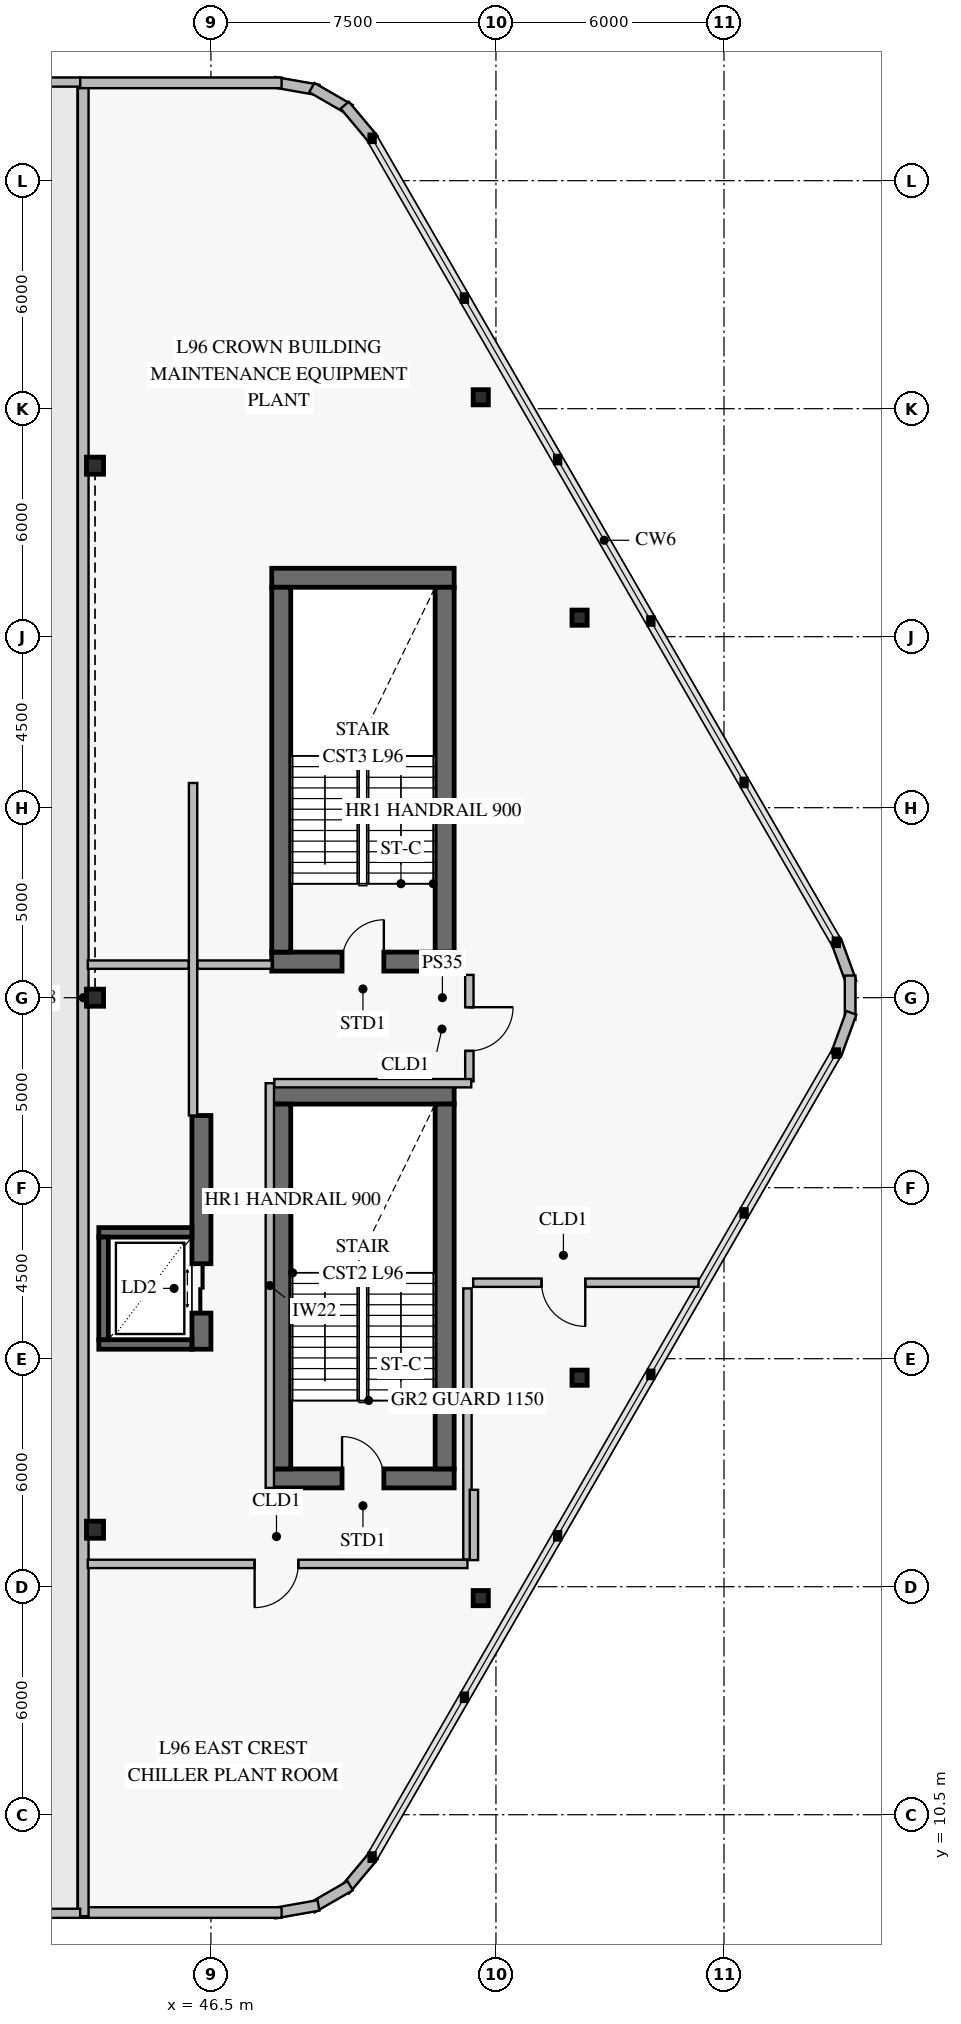
"""IFC4 building model, lengths in metres.
Left out: names, types, materials, properties, quantities, classifications, styles, units other than length and angle.
Written with IfcOpenShell. Run it as: python <this file> out.ifc"""

import sys

from ifc_helpers import new_model, si_unit, direction, frame, frame_2d, origin, origin_2d, place, context, subcontext, project, spatial, rectangle, hollow_rectangle, i_section, extrude, element, fill, save


model = new_model("IFC4")
c1 = context("Model", 3, precision=1e-05, world=origin(), true_north=direction((0.0, 1.0)))
c2 = subcontext(c1, "Body", "Model", "MODEL_VIEW")
j1 = project(units=[si_unit("LENGTHUNIT", "METRE"), si_unit("PLANEANGLEUNIT", "RADIAN")], contexts=[c1])
p1 = place(None, origin())
s1 = spatial("IfcSite", under=j1, at=p1, CompositionType="ELEMENT")
p2 = place(p1, origin())
s2 = spatial("IfcBuilding", under=s1, at=p2, CompositionType="ELEMENT")
p3 = place(p2, frame((0.0, 0.0, 379.0)))
s3 = spatial("IfcBuildingStorey", under=s2, at=p3, CompositionType="ELEMENT", Elevation=379.0)
p4 = place(p3, frame((48.1, 19.35, 0.0), z_axis=(0.0, 0.0, 1.0), x_axis=(1.0, 0.0, 0.0)))
e1 = element("IfcWall", 1, at=p4, inside=s3, PredefinedType="SHEAR", context=c2, shape_type="SweptSolid", body=[
    extrude(rectangle(XDim=4.8, YDim=0.5, at=frame_2d((2.4, 0.0))), origin(), (0.0, 0.0, 1.0), 4.4),
])
p5 = place(p4, frame((1.85, 0.0, 0.0)))
e2 = element("IfcOpeningElement", 2, at=p5, cuts=e1, PredefinedType="OPENING", context=c2, shape_type="SweptSolid", body=[
    extrude(rectangle(XDim=1.1, YDim=2.15, at=frame_2d((0.55, 1.075))), frame((0.0, 0.262, 0.0), z_axis=(0.0, -1.0, 0.0), x_axis=(1.0, 0.0, 0.0)), (0.0, 0.0, 1.0), 0.524),
])
p6 = place(p3, frame((52.9, 29.45, 0.0), z_axis=(0.0, 0.0, 1.0), x_axis=(-1.0, 0.0, 0.0)))
e3 = element("IfcWall", 3, at=p6, inside=s3, PredefinedType="SHEAR", context=c2, shape_type="SweptSolid", body=[
    extrude(rectangle(XDim=4.8, YDim=0.5, at=frame_2d((2.4, 0.0))), origin(), (0.0, 0.0, 1.0), 4.4),
])
for number, where, z_axis, x_axis in (
    (4, (48.35, 19.6, 0.0), (0.0, 0.0, 1.0), (0.0, 1.0, 0.0)),
    (5, (52.65, 29.2, 0.0), (0.0, 0.0, 1.0), (0.0, -1.0, 0.0)),
):
    element("IfcWall", number, at=place(p3, frame(where, z_axis=z_axis, x_axis=x_axis)), inside=s3, PredefinedType="SHEAR", context=c2, shape_type="SweptSolid", body=[
        extrude(rectangle(XDim=9.6, YDim=0.5, at=frame_2d((4.8, 0.0))), origin(), (0.0, 0.0, 1.0), 4.4),
    ])
p7 = place(p3, frame((48.1, 32.95, 0.0), z_axis=(0.0, 0.0, 1.0), x_axis=(1.0, 0.0, 0.0)))
e6 = element("IfcWall", 6, at=p7, inside=s3, PredefinedType="SHEAR", context=c2, shape_type="SweptSolid", body=[
    extrude(rectangle(XDim=4.8, YDim=0.5, at=frame_2d((2.4, 0.0))), origin(), (0.0, 0.0, 1.0), 4.4),
])
p8 = place(p7, frame((1.85, 0.0, 0.0)))
e7 = element("IfcOpeningElement", 7, at=p8, cuts=e6, PredefinedType="OPENING", context=c2, shape_type="SweptSolid", body=[
    extrude(rectangle(XDim=1.1, YDim=2.15, at=frame_2d((0.55, 1.075))), frame((0.0, 0.262, 0.0), z_axis=(0.0, -1.0, 0.0), x_axis=(1.0, 0.0, 0.0)), (0.0, 0.0, 1.0), 0.524),
])
p9 = place(p3, frame((52.9, 43.05, 0.0), z_axis=(0.0, 0.0, 1.0), x_axis=(-1.0, 0.0, 0.0)))
e8 = element("IfcWall", 8, at=p9, inside=s3, PredefinedType="SHEAR", context=c2, shape_type="SweptSolid", body=[
    extrude(rectangle(XDim=4.8, YDim=0.5, at=frame_2d((2.4, 0.0))), origin(), (0.0, 0.0, 1.0), 4.4),
])
for number, where, z_axis, x_axis in (
    (9, (48.35, 33.2, 0.0), (0.0, 0.0, 1.0), (0.0, 1.0, 0.0)),
    (10, (52.65, 42.8, 0.0), (0.0, 0.0, 1.0), (0.0, -1.0, 0.0)),
):
    element("IfcWall", number, at=place(p3, frame(where, z_axis=z_axis, x_axis=x_axis)), inside=s3, PredefinedType="SHEAR", context=c2, shape_type="SweptSolid", body=[
        extrude(rectangle(XDim=9.6, YDim=0.5, at=frame_2d((4.8, 0.0))), origin(), (0.0, 0.0, 1.0), 4.4),
    ])
p10 = place(p3, frame((46.25, 22.75, 0.0), z_axis=(0.0, 0.0, 1.0), x_axis=(0.0, 1.0, 0.0)))
e11 = element("IfcWall", 11, at=p10, inside=s3, PredefinedType="SHEAR", context=c2, shape_type="SweptSolid", body=[
    extrude(rectangle(XDim=6.15, YDim=0.5, at=frame_2d((3.075, 0.0))), origin(), (0.0, 0.0, 1.0), 4.4),
])
p11 = place(p10, frame((0.95, 0.0, 0.0)))
e12 = element("IfcOpeningElement", 12, at=p11, cuts=e11, PredefinedType="OPENING", context=c2, shape_type="SweptSolid", body=[
    extrude(rectangle(XDim=1.3, YDim=2.3, at=frame_2d((0.65, 1.15))), frame((0.0, 0.262, 0.0), z_axis=(0.0, -1.0, 0.0), x_axis=(1.0, 0.0, 0.0)), (0.0, 0.0, 1.0), 0.524),
])
for number, where, z_axis, x_axis in (
    (13, (56.2, 22.0, 0.0), (0.0, 0.0, 1.0), (1.0, 0.0, 0.0)),
    (14, (56.2, 42.0, 0.0), (0.0, 0.0, 1.0), (1.0, 0.0, 0.0)),
    (15, (53.6, 16.2, 0.0), (0.0, 0.0, 1.0), (1.0, 0.0, 0.0)),
    (16, (53.6, 47.8, 0.0), (0.0, 0.0, 1.0), (1.0, 0.0, 0.0)),
):
    element("IfcColumn", number, at=place(p3, frame(where, z_axis=z_axis, x_axis=x_axis)), inside=s3, PredefinedType="COLUMN", context=c2, shape_type="SweptSolid", body=[
        extrude(i_section(OverallWidth=0.4, OverallDepth=0.4, WebThickness=0.013, FlangeThickness=0.021, at=origin_2d()), origin(), (0.0, 0.0, 1.0), 4.05),
    ])
for number, where, z_axis, x_axis in (
    (17, (43.45, 18.0, 0.0), (0.0, 0.0, 1.0), (1.0, 0.0, 0.0)),
    (18, (43.45, 32.0, 0.0), (0.0, 0.0, 1.0), (1.0, 0.0, 0.0)),
    (19, (43.45, 46.0, 0.0), (0.0, 0.0, 1.0), (1.0, 0.0, 0.0)),
):
    element("IfcColumn", number, at=place(p3, frame(where, z_axis=z_axis, x_axis=x_axis)), inside=s3, PredefinedType="PILASTER", context=c2, shape_type="SweptSolid", body=[
        extrude(hollow_rectangle(XDim=0.45, YDim=0.45, WallThickness=0.022, at=origin_2d()), origin(), (0.0, 0.0, 1.0), 4.05),
    ])
p12 = place(p3, frame((48.171, 56.091, 0.0), z_axis=(0.0, 0.0, 1.0), x_axis=(0.984798162481, -0.173702559495, 0.0)))
e20 = element("IfcWall", 20, at=p12, inside=s3, PredefinedType="SOLIDWALL", context=c2, shape_type="SweptSolid", body=[
    extrude(rectangle(XDim=1.178, YDim=0.28, at=frame_2d((0.589, 0.0))), origin(), (0.0, 0.0, 1.0), 4.05),
])
p13 = place(p3, frame((49.155, 55.95, 0.0), z_axis=(0.0, 0.0, 1.0), x_axis=(0.865951785477, -0.500127488975, 0.0)))
e21 = element("IfcWall", 21, at=p13, inside=s3, PredefinedType="SOLIDWALL", context=c2, shape_type="SweptSolid", body=[
    extrude(rectangle(XDim=1.165, YDim=0.28, at=frame_2d((0.583, 0.0))), origin(), (0.0, 0.0, 1.0), 4.05),
])
for number, where, z_axis, x_axis in (
    (22, (50.021, 55.488, 0.0), (0.0, 0.0, 1.0), (0.643, -0.766, 0.0)),
    (23, (62.948, 33.505, 0.0), (0.0, 0.0, 1.0), (0.342, -0.94, 0.0)),
):
    element("IfcWall", number, at=place(p3, frame(where, z_axis=z_axis, x_axis=x_axis)), inside=s3, PredefinedType="SOLIDWALL", context=c2, shape_type="SweptSolid", body=[
        extrude(rectangle(XDim=1.178, YDim=0.28, at=frame_2d((0.589, 0.0))), origin(), (0.0, 0.0, 1.0), 4.05),
    ])
p14 = place(p3, frame((63.319, 32.583, 0.0), z_axis=(0.0, 0.0, 1.0), x_axis=(0.0, -1.0, 0.0)))
e24 = element("IfcWall", 24, at=p14, inside=s3, PredefinedType="SOLIDWALL", context=c2, shape_type="SweptSolid", body=[
    extrude(rectangle(XDim=1.165, YDim=0.28, at=frame_2d((0.583, 0.0))), origin(), (0.0, 0.0, 1.0), 4.05),
])
for number, where, z_axis, x_axis in (
    (25, (63.351, 31.602, 0.0), (0.0, 0.0, 1.0), (-0.342, -0.94, 0.0)),
    (26, (50.778, 9.414, 0.0), (0.0, 0.0, 1.0), (-0.643, -0.766, 0.0)),
):
    element("IfcWall", number, at=place(p3, frame(where, z_axis=z_axis, x_axis=x_axis)), inside=s3, PredefinedType="SOLIDWALL", context=c2, shape_type="SweptSolid", body=[
        extrude(rectangle(XDim=1.178, YDim=0.28, at=frame_2d((0.589, 0.0))), origin(), (0.0, 0.0, 1.0), 4.05),
    ])
p15 = place(p3, frame((50.164, 8.633, 0.0), z_axis=(0.0, 0.0, 1.0), x_axis=(-0.865951785477, -0.500127488975, 0.0)))
e27 = element("IfcWall", 27, at=p15, inside=s3, PredefinedType="SOLIDWALL", context=c2, shape_type="SweptSolid", body=[
    extrude(rectangle(XDim=1.165, YDim=0.28, at=frame_2d((0.583, 0.0))), origin(), (0.0, 0.0, 1.0), 4.05),
])
p16 = place(p3, frame((49.331, 8.114, 0.0), z_axis=(0.0, 0.0, 1.0), x_axis=(-0.984798162481, -0.173702559495, 0.0)))
e28 = element("IfcWall", 28, at=p16, inside=s3, PredefinedType="SOLIDWALL", context=c2, shape_type="SweptSolid", body=[
    extrude(rectangle(XDim=1.178, YDim=0.28, at=frame_2d((0.589, 0.0))), origin(), (0.0, 0.0, 1.0), 4.05),
])
p17 = place(p3, frame((48.36, 7.926, 0.0), z_axis=(0.0, 0.0, 1.0), x_axis=(-1.0, 0.0, 0.0)))
e29 = element("IfcWall", 29, at=p17, inside=s3, PredefinedType="SOLIDWALL", context=c2, shape_type="SweptSolid", body=[
    extrude(rectangle(XDim=5.315, YDim=0.28, at=frame_2d((2.657, 0.0))), origin(), (0.0, 0.0, 1.0), 4.05),
])
p18 = place(p3, frame((43.14, 7.831, 0.0), z_axis=(0.0, 0.0, 1.0), x_axis=(0.0, 1.0, 0.0)))
e30 = element("IfcWall", 30, at=p18, inside=s3, PredefinedType="SOLIDWALL", context=c2, shape_type="SweptSolid", body=[
    extrude(rectangle(XDim=48.338, YDim=0.28, at=frame_2d((24.169, 0.0))), origin(), (0.0, 0.0, 1.0), 3.47),
])
p19 = place(p3, frame((43.045, 56.074, 0.0), z_axis=(0.0, 0.0, 1.0), x_axis=(1.0, 0.0, 0.0)))
e31 = element("IfcWall", 31, at=p19, inside=s3, PredefinedType="SOLIDWALL", context=c2, shape_type="SweptSolid", body=[
    extrude(rectangle(XDim=5.315, YDim=0.28, at=frame_2d((2.657, 0.0))), origin(), (0.0, 0.0, 1.0), 4.05),
])
for number, where, z_axis, x_axis in (
    (32, (43.06, 7.906, 0.0), (0.0, 0.0, 1.0), (-1.0, 0.0, 0.0)),
    (33, (28.94, 56.094, 0.0), (0.0, 0.0, 1.0), (1.0, 0.0, 0.0)),
):
    element("IfcWall", number, at=place(p3, frame(where, z_axis=z_axis, x_axis=x_axis)), inside=s3, PredefinedType="PARAPET", context=c2, shape_type="SweptSolid", body=[
        extrude(rectangle(XDim=14.12, YDim=0.24, at=frame_2d((7.06, 0.0))), origin(), (0.0, 0.0, 1.0), 1.2),
    ])
for number, where, z_axis, x_axis in (
    (34, (43.55, 22.875, 0.0), (0.0, 0.0, 1.0), (1.0, 0.0, 0.0)),
    (35, (43.55, 25.825, 0.0), (0.0, 0.0, 1.0), (1.0, 0.0, 0.0)),
):
    element("IfcWall", number, at=place(p3, frame(where, z_axis=z_axis, x_axis=x_axis)), inside=s3, PredefinedType="SOLIDWALL", context=c2, shape_type="SweptSolid", body=[
        extrude(rectangle(XDim=2.45, YDim=0.25, at=frame_2d((1.225, 0.0))), origin(), (0.0, 0.0, 1.0), 4.4),
    ])
p20 = place(p3, frame((43.675, 23.0, 0.0), z_axis=(0.0, 0.0, 1.0), x_axis=(0.0, 1.0, 0.0)))
e36 = element("IfcWall", 36, at=p20, inside=s3, PredefinedType="SOLIDWALL", context=c2, shape_type="SweptSolid", body=[
    extrude(rectangle(XDim=2.7, YDim=0.25, at=frame_2d((1.35, 0.0))), origin(), (0.0, 0.0, 1.0), 4.4),
])
p21 = place(p3, frame((53.4, 24.5, 0.0), z_axis=(0.0, 0.0, 1.0), x_axis=(1.0, 0.0, 0.0)))
e37 = element("IfcWall", 37, at=p21, inside=s3, PredefinedType="PARTITIONING", context=c2, shape_type="SweptSolid", body=[
    extrude(rectangle(XDim=5.93, YDim=0.22, at=frame_2d((2.965, 0.0))), origin(), (0.0, 0.0, 1.0), 3.47),
])
p22 = place(p21, frame((1.8, 0.0, 0.0)))
e38 = element("IfcOpeningElement", 38, at=p22, cuts=e37, PredefinedType="OPENING", context=c2, shape_type="SweptSolid", body=[
    extrude(rectangle(XDim=1.15, YDim=2.2, at=frame_2d((0.575, 1.1))), frame((0.0, 0.122, 0.0), z_axis=(0.0, -1.0, 0.0), x_axis=(1.0, 0.0, 0.0)), (0.0, 0.0, 1.0), 0.244),
])
p23 = place(p3, frame((43.26, 17.1, 0.0), z_axis=(0.0, 0.0, 1.0), x_axis=(1.0, 0.0, 0.0)))
e39 = element("IfcWall", 39, at=p23, inside=s3, PredefinedType="PARTITIONING", context=c2, shape_type="SweptSolid", body=[
    extrude(rectangle(XDim=9.99, YDim=0.22, at=frame_2d((4.995, 0.0))), origin(), (0.0, 0.0, 1.0), 3.47),
])
p24 = place(p23, frame((4.39, 0.0, 0.0)))
e40 = element("IfcOpeningElement", 40, at=p24, cuts=e39, PredefinedType="OPENING", context=c2, shape_type="SweptSolid", body=[
    extrude(rectangle(XDim=1.15, YDim=2.2, at=frame_2d((0.575, 1.1))), frame((0.0, 0.122, 0.0), z_axis=(0.0, -1.0, 0.0), x_axis=(1.0, 0.0, 0.0)), (0.0, 0.0, 1.0), 0.244),
])
p25 = place(p3, frame((53.3, 29.8, 0.0), z_axis=(0.0, 0.0, 1.0), x_axis=(0.0, 1.0, 0.0)))
e41 = element("IfcWall", 41, at=p25, inside=s3, PredefinedType="PARTITIONING", context=c2, shape_type="SweptSolid", body=[
    extrude(rectangle(XDim=2.8, YDim=0.22, at=frame_2d((1.4, 0.0))), origin(), (0.0, 0.0, 1.0), 4.05),
])
p26 = place(p25, frame((0.8, 0.0, 0.0)))
e42 = element("IfcOpeningElement", 42, at=p26, cuts=e41, PredefinedType="OPENING", context=c2, shape_type="SweptSolid", body=[
    extrude(rectangle(XDim=1.15, YDim=2.2, at=frame_2d((0.575, 1.1))), frame((0.0, 0.122, 0.0), z_axis=(0.0, -1.0, 0.0), x_axis=(1.0, 0.0, 0.0)), (0.0, 0.0, 1.0), 0.244),
])
p27 = place(p3, frame((53.25, 17.218, 0.0), z_axis=(0.0, 0.0, 1.0), x_axis=(0.0, 1.0, 0.0)))
e43 = element("IfcWall", 43, at=p27, inside=s3, PredefinedType="PARTITIONING", context=c2, shape_type="SweptSolid", body=[
    extrude(rectangle(XDim=7.132, YDim=0.22, at=frame_2d((3.566, 0.0))), origin(), (0.0, 0.0, 1.0), 3.47),
])
p28 = place(p3, frame((48.05, 19.1, 0.0), z_axis=(0.0, 0.0, 1.0), x_axis=(0.0, 1.0, 0.0)))
e44 = element("IfcWall", 44, at=p28, inside=s3, PredefinedType="PARTITIONING", context=c2, shape_type="SweptSolid", body=[
    extrude(rectangle(XDim=10.65, YDim=0.22, at=frame_2d((5.325, 0.0))), origin(), (0.0, 0.0, 1.0), 3.47),
])
p29 = place(p3, frame((48.168, 29.75, 0.0), z_axis=(0.0, 0.0, 1.0), x_axis=(1.0, 0.0, 0.0)))
e45 = element("IfcWall", 45, at=p29, inside=s3, PredefinedType="PARTITIONING", context=c2, shape_type="SweptSolid", body=[
    extrude(rectangle(XDim=5.182, YDim=0.22, at=frame_2d((2.591, 0.0))), origin(), (0.0, 0.0, 1.0), 4.05),
])
p30 = place(p3, frame((53.42, 17.2, 0.0), z_axis=(0.0, 0.0, 1.0), x_axis=(0.0, 1.0, 0.0)))
e46 = element("IfcWall", 46, at=p30, inside=s3, PredefinedType="PARTITIONING", context=c2, shape_type="SweptSolid", body=[
    extrude(rectangle(XDim=1.85, YDim=0.22, at=frame_2d((0.925, 0.0))), origin(), (0.0, 0.0, 1.0), 4.05),
])
p31 = place(p3, frame((46.03, 37.65, 0.0), z_axis=(0.0, 0.0, 1.0), x_axis=(0.0, -1.0, 0.0)))
e47 = element("IfcWall", 47, at=p31, inside=s3, PredefinedType="PARTITIONING", context=c2, shape_type="SweptSolid", body=[
    extrude(rectangle(XDim=8.75, YDim=0.22, at=frame_2d((4.375, 0.0))), origin(), (0.0, 0.0, 1.0), 4.05),
])
p32 = place(p3, frame((48.1, 32.87, 0.0), z_axis=(0.0, 0.0, 1.0), x_axis=(-1.0, 0.0, 0.0)))
e48 = element("IfcWall", 48, at=p32, inside=s3, PredefinedType="PARTITIONING", context=c2, shape_type="SweptSolid", body=[
    extrude(rectangle(XDim=1.952, YDim=0.22, at=frame_2d((0.976, 0.0))), origin(), (0.0, 0.0, 1.0), 4.05),
])
p33 = place(p3, frame((45.912, 32.87, 0.0), z_axis=(0.0, 0.0, 1.0), x_axis=(-1.0, 0.0, 0.0)))
e49 = element("IfcWall", 49, at=p33, inside=s3, PredefinedType="PARTITIONING", context=c2, shape_type="SweptSolid", body=[
    extrude(rectangle(XDim=2.652, YDim=0.22, at=frame_2d((1.326, 0.0))), origin(), (0.0, 0.0, 1.0), 3.47),
])
p34 = place(p5, origin())
e50 = element("IfcDoor", 50, at=p34, inside=s3, OperationType="SINGLE_SWING_LEFT", PredefinedType="USERDEFINED", context=c2, shape_type="SweptSolid", body=[
    extrude(rectangle(XDim=1.1, YDim=2.15, at=frame_2d((0.55, 1.075))), frame((0.0, 0.025, 0.0), z_axis=(0.0, -1.0, 0.0), x_axis=(1.0, 0.0, 0.0)), (0.0, 0.0, 1.0), 0.05),
])
fill(e2, e50)
p35 = place(p8, origin())
e51 = element("IfcDoor", 51, at=p35, inside=s3, OperationType="SINGLE_SWING_RIGHT", PredefinedType="USERDEFINED", context=c2, shape_type="SweptSolid", body=[
    extrude(rectangle(XDim=1.1, YDim=2.15, at=frame_2d((0.55, 1.075))), frame((0.0, 0.025, 0.0), z_axis=(0.0, -1.0, 0.0), x_axis=(1.0, 0.0, 0.0)), (0.0, 0.0, 1.0), 0.05),
])
fill(e7, e51)
p36 = place(p11, frame((1.3, 0.0, 0.0), z_axis=(0.0, 0.0, 1.0), x_axis=(-1.0, 0.0, 0.0)))
e52 = element("IfcDoor", 52, at=p36, inside=s3, OperationType="DOUBLE_DOOR_SLIDING", PredefinedType="DOOR", context=c2, shape_type="SweptSolid", body=[
    extrude(rectangle(XDim=1.3, YDim=2.3, at=frame_2d((0.65, 1.15))), frame((0.0, 0.025, 0.0), z_axis=(0.0, -1.0, 0.0), x_axis=(1.0, 0.0, 0.0)), (0.0, 0.0, 1.0), 0.05),
])
fill(e12, e52)
p37 = place(p22, frame((1.15, 0.0, 0.0), z_axis=(0.0, 0.0, 1.0), x_axis=(-1.0, 0.0, 0.0)))
e53 = element("IfcDoor", 53, at=p37, inside=s3, OperationType="SINGLE_SWING_LEFT", PredefinedType="DOOR", context=c2, shape_type="SweptSolid", body=[
    extrude(rectangle(XDim=1.15, YDim=2.2, at=frame_2d((0.575, 1.1))), frame((0.0, 0.025, 0.0), z_axis=(0.0, -1.0, 0.0), x_axis=(1.0, 0.0, 0.0)), (0.0, 0.0, 1.0), 0.05),
])
fill(e38, e53)
p38 = place(p24, frame((1.15, 0.0, 0.0), z_axis=(0.0, 0.0, 1.0), x_axis=(-1.0, 0.0, 0.0)))
e54 = element("IfcDoor", 54, at=p38, inside=s3, OperationType="SINGLE_SWING_RIGHT", PredefinedType="DOOR", context=c2, shape_type="SweptSolid", body=[
    extrude(rectangle(XDim=1.15, YDim=2.2, at=frame_2d((0.575, 1.1))), frame((0.0, 0.025, 0.0), z_axis=(0.0, -1.0, 0.0), x_axis=(1.0, 0.0, 0.0)), (0.0, 0.0, 1.0), 0.05),
])
fill(e40, e54)
p39 = place(p26, frame((1.15, 0.0, 0.0), z_axis=(0.0, 0.0, 1.0), x_axis=(-1.0, 0.0, 0.0)))
e55 = element("IfcDoor", 55, at=p39, inside=s3, OperationType="SINGLE_SWING_LEFT", PredefinedType="DOOR", context=c2, shape_type="SweptSolid", body=[
    extrude(rectangle(XDim=1.15, YDim=2.2, at=frame_2d((0.575, 1.1))), frame((0.0, 0.025, 0.0), z_axis=(0.0, -1.0, 0.0), x_axis=(1.0, 0.0, 0.0)), (0.0, 0.0, 1.0), 0.05),
])
fill(e42, e55)
save(model, sys.argv[1])
